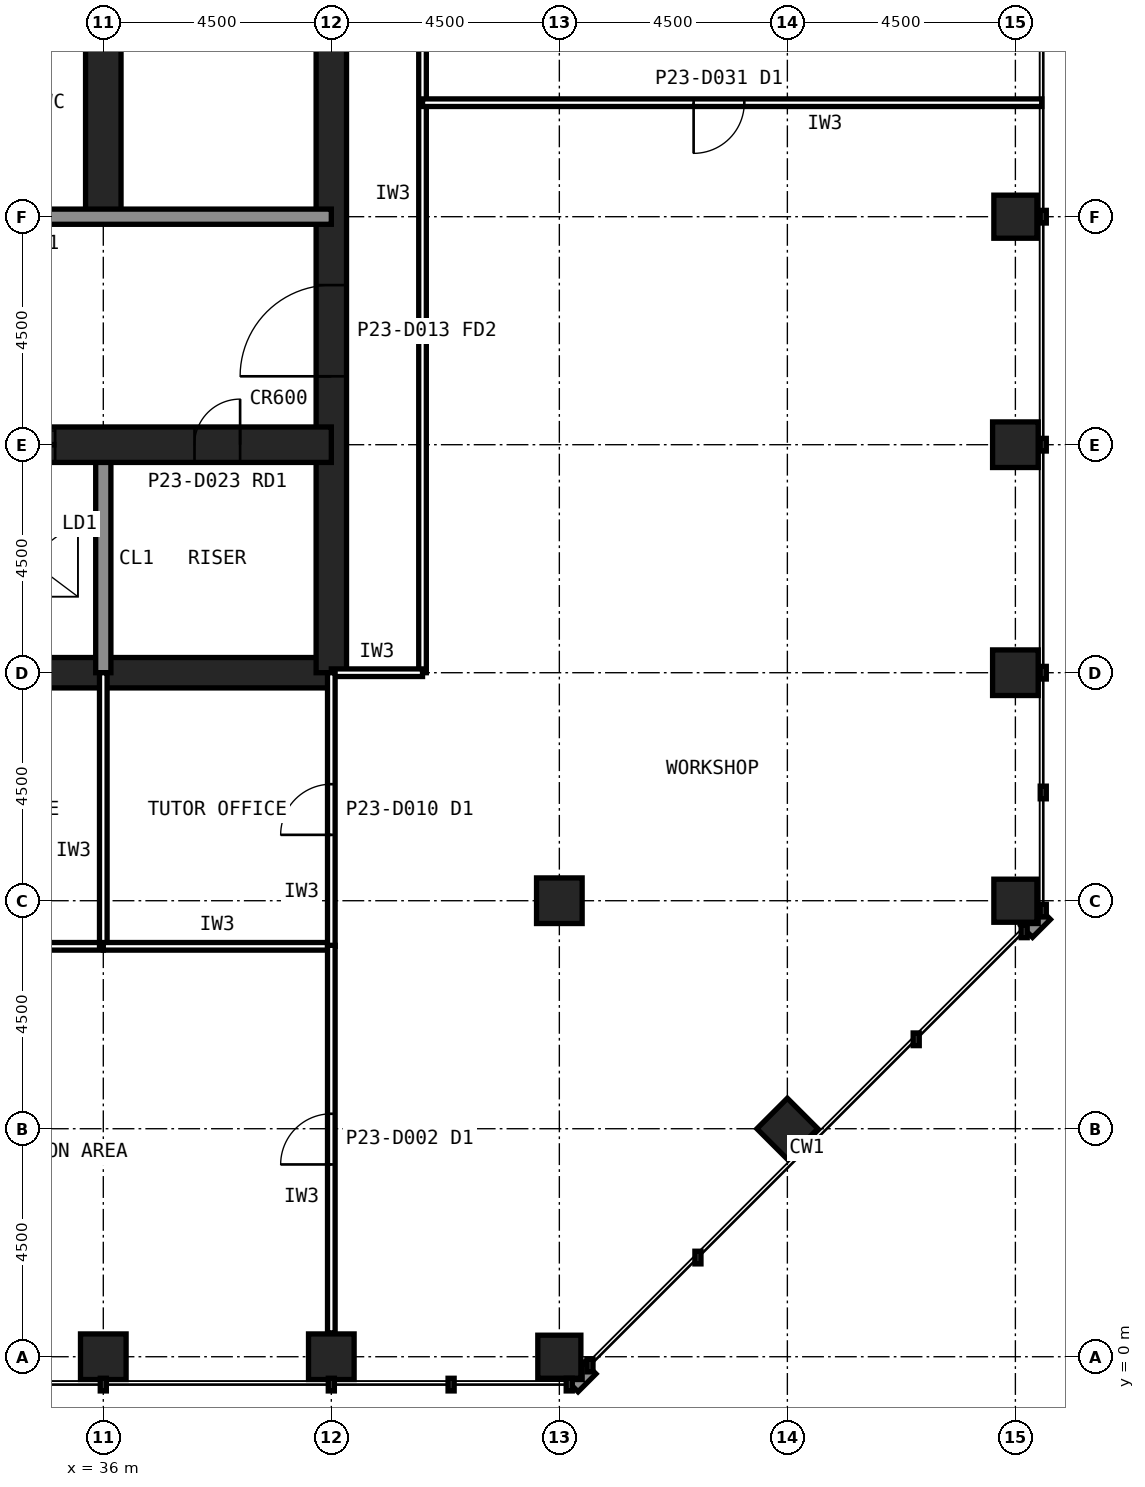
"""IFC4 building model, lengths in metres.
Left out: names, types, materials, properties, quantities, classifications, styles, units other than length and angle.
Written with IfcOpenShell. Run it as: python <this file> out.ifc"""

import sys

from ifc_helpers import new_model, si_unit, direction, frame, frame_2d, origin, origin_2d, place, context, subcontext, project, spatial, rectangle, hollow_rectangle, extrude, element, fill, save


model = new_model("IFC4")
c1 = context("Model", 3, precision=1e-05, world=origin(), true_north=direction((0.0, 1.0)))
c2 = subcontext(c1, "Body", "Model", "MODEL_VIEW")
j1 = project(units=[si_unit("LENGTHUNIT", "METRE"), si_unit("PLANEANGLEUNIT", "RADIAN")], contexts=[c1])
p1 = place(None, origin())
s1 = spatial("IfcSite", under=j1, at=p1, CompositionType="ELEMENT")
p2 = place(p1, origin())
s2 = spatial("IfcBuilding", under=s1, at=p2, CompositionType="ELEMENT")
p3 = place(p2, frame((0.0, 0.0, 96.2)))
s3 = spatial("IfcBuildingStorey", under=s2, at=p3, CompositionType="ELEMENT", Elevation=96.2)
p4 = place(p3, frame((36.0, 0.0, 0.0), z_axis=(0.0, 0.0, 1.0), x_axis=(1.0, 0.0, 0.0)))
e1 = element("IfcColumn", 1, at=p4, inside=s3, PredefinedType="COLUMN", context=c2, shape_type="SweptSolid", body=[
    extrude(hollow_rectangle(XDim=0.9, YDim=0.9, WallThickness=0.063, at=origin_2d()), origin(), (0.0, 0.0, 1.0), 4.2),
])
p5 = place(p3, frame((40.5, 0.0, 0.0), z_axis=(0.0, 0.0, 1.0), x_axis=(1.0, 0.0, 0.0)))
e2 = element("IfcColumn", 2, at=p5, inside=s3, PredefinedType="COLUMN", context=c2, shape_type="SweptSolid", body=[
    extrude(hollow_rectangle(XDim=0.85, YDim=0.85, WallThickness=0.05, at=origin_2d()), origin(), (0.0, 0.0, 1.0), 4.2),
])
for number, where, z_axis, x_axis in (
    (3, (45.0, 0.0, 0.0), (0.0, 0.0, 1.0), (1.0, 0.0, 0.0)),
    (4, (54.0, 9.0, 0.0), (0.0, 0.0, 1.0), (1.0, 0.0, 0.0)),
):
    element("IfcColumn", number, at=place(p3, frame(where, z_axis=z_axis, x_axis=x_axis)), inside=s3, PredefinedType="COLUMN", context=c2, shape_type="SweptSolid", body=[
        extrude(hollow_rectangle(XDim=0.8, YDim=0.8, WallThickness=0.045, at=origin_2d()), origin(), (0.0, 0.0, 1.0), 4.2),
    ])
p6 = place(p3, frame((54.0, 13.5, 0.0), z_axis=(0.0, 0.0, 1.0), x_axis=(1.0, 0.0, 0.0)))
e5 = element("IfcColumn", 5, at=p6, inside=s3, PredefinedType="COLUMN", context=c2, shape_type="SweptSolid", body=[
    extrude(hollow_rectangle(XDim=0.85, YDim=0.85, WallThickness=0.05, at=origin_2d()), origin(), (0.0, 0.0, 1.0), 4.2),
])
p7 = place(p3, frame((54.0, 18.0, 0.0), z_axis=(0.0, 0.0, 1.0), x_axis=(1.0, 0.0, 0.0)))
e6 = element("IfcColumn", 6, at=p7, inside=s3, PredefinedType="COLUMN", context=c2, shape_type="SweptSolid", body=[
    extrude(hollow_rectangle(XDim=0.9, YDim=0.9, WallThickness=0.063, at=origin_2d()), origin(), (0.0, 0.0, 1.0), 4.2),
])
for number, where, z_axis, x_axis in (
    (7, (54.0, 22.5, 0.0), (0.0, 0.0, 1.0), (1.0, 0.0, 0.0)),
    (8, (49.5, 4.5, 0.0), (0.0, 0.0, 1.0), (0.707, 0.707, 0.0)),
):
    element("IfcColumn", number, at=place(p3, frame(where, z_axis=z_axis, x_axis=x_axis)), inside=s3, PredefinedType="COLUMN", context=c2, shape_type="SweptSolid", body=[
        extrude(hollow_rectangle(XDim=0.8, YDim=0.8, WallThickness=0.045, at=origin_2d()), origin(), (0.0, 0.0, 1.0), 4.2),
    ])
p8 = place(p3, frame((45.0, 9.0, 0.0), z_axis=(0.0, 0.0, 1.0), x_axis=(1.0, 0.0, 0.0)))
e9 = element("IfcColumn", 9, at=p8, inside=s3, PredefinedType="COLUMN", context=c2, shape_type="SweptSolid", body=[
    extrude(hollow_rectangle(XDim=0.9, YDim=0.9, WallThickness=0.063, at=origin_2d()), origin(), (0.0, 0.0, 1.0), 4.2),
])
p9 = place(p3, frame((13.5, 13.5, 0.0), z_axis=(0.0, 0.0, 1.0), x_axis=(1.0, 0.0, 0.0)))
e10 = element("IfcWall", 10, at=p9, inside=s3, PredefinedType="SHEAR", context=c2, shape_type="SweptSolid", body=[
    extrude(rectangle(XDim=27.0, YDim=0.6, at=frame_2d((13.5, 0.0))), origin(), (0.0, 0.0, 1.0), 4.2),
])
p10 = place(p3, frame((40.5, 13.5, 0.0), z_axis=(0.0, 0.0, 1.0), x_axis=(0.0, 1.0, 0.0)))
e11 = element("IfcWall", 11, at=p10, inside=s3, PredefinedType="SHEAR", context=c2, shape_type="SweptSolid", body=[
    extrude(rectangle(XDim=27.0, YDim=0.6, at=frame_2d((13.5, 0.0))), origin(), (0.0, 0.0, 1.0), 4.2),
])
p11 = place(p10, frame((5.85, 0.0, 0.0)))
e12 = element("IfcOpeningElement", 12, at=p11, cuts=e11, PredefinedType="OPENING", context=c2, shape_type="SweptSolid", body=[
    extrude(rectangle(XDim=1.8, YDim=2.1, at=frame_2d((0.9, 1.05))), frame((0.0, 0.31, 0.0), z_axis=(0.0, -1.0, 0.0), x_axis=(1.0, 0.0, 0.0)), (0.0, 0.0, 1.0), 0.62),
])
p12 = place(p10, frame((19.65, 0.0, 0.0)))
e13 = element("IfcOpeningElement", 13, at=p12, cuts=e11, PredefinedType="OPENING", context=c2, shape_type="SweptSolid", body=[
    extrude(rectangle(XDim=1.2, YDim=2.1, at=frame_2d((0.6, 1.05))), frame((0.0, 0.31, 0.0), z_axis=(0.0, -1.0, 0.0), x_axis=(1.0, 0.0, 0.0)), (0.0, 0.0, 1.0), 0.62),
])
p13 = place(p3, frame((36.0, 13.5, 0.0), z_axis=(0.0, 0.0, 1.0), x_axis=(0.0, 1.0, 0.0)))
e14 = element("IfcWall", 14, at=p13, inside=s3, PredefinedType="SOLIDWALL", context=c2, shape_type="SweptSolid", body=[
    extrude(rectangle(XDim=4.5, YDim=0.3, at=frame_2d((2.25, 0.0))), origin(), (0.0, 0.0, 1.0), 4.04),
])
p14 = place(p3, frame((36.0, 22.5, 0.0), z_axis=(0.0, 0.0, 1.0), x_axis=(0.0, 1.0, 0.0)))
e15 = element("IfcWall", 15, at=p14, inside=s3, PredefinedType="SHEAR", context=c2, shape_type="SweptSolid", body=[
    extrude(rectangle(XDim=18.0, YDim=0.7, at=frame_2d((9.0, 0.0))), origin(), (0.0, 0.0, 1.0), 4.2),
])
p15 = place(p3, frame((13.5, 18.0, 0.0), z_axis=(0.0, 0.0, 1.0), x_axis=(1.0, 0.0, 0.0)))
e16 = element("IfcWall", 16, at=p15, inside=s3, PredefinedType="SHEAR", context=c2, shape_type="SweptSolid", body=[
    extrude(rectangle(XDim=27.0, YDim=0.7, at=frame_2d((13.5, 0.0))), origin(), (0.0, 0.0, 1.0), 4.2),
])
p16 = place(p15, frame((24.3, 0.0, 0.0)))
e17 = element("IfcOpeningElement", 17, at=p16, cuts=e16, PredefinedType="OPENING", context=c2, shape_type="SweptSolid", body=[
    extrude(rectangle(XDim=0.9, YDim=2.1, at=frame_2d((0.45, 1.05))), frame((0.0, 0.36, 0.0), z_axis=(0.0, -1.0, 0.0), x_axis=(1.0, 0.0, 0.0)), (0.0, 0.0, 1.0), 0.72),
])
p17 = place(p15, frame((5.45, 0.0, 0.0)))
e18 = element("IfcOpeningElement", 18, at=p17, cuts=e16, PredefinedType="OPENING", context=c2, shape_type="SweptSolid", body=[
    extrude(rectangle(XDim=1.1, YDim=2.1, at=frame_2d((0.55, 1.05))), frame((0.0, 0.36, 0.0), z_axis=(0.0, -1.0, 0.0), x_axis=(1.0, 0.0, 0.0)), (0.0, 0.0, 1.0), 0.72),
])
p18 = place(p15, frame((8.45, 0.0, 0.0)))
e19 = element("IfcOpeningElement", 19, at=p18, cuts=e16, PredefinedType="OPENING", context=c2, shape_type="SweptSolid", body=[
    extrude(rectangle(XDim=1.1, YDim=2.1, at=frame_2d((0.55, 1.05))), frame((0.0, 0.36, 0.0), z_axis=(0.0, -1.0, 0.0), x_axis=(1.0, 0.0, 0.0)), (0.0, 0.0, 1.0), 0.72),
])
p19 = place(p15, frame((11.45, 0.0, 0.0)))
e20 = element("IfcOpeningElement", 20, at=p19, cuts=e16, PredefinedType="OPENING", context=c2, shape_type="SweptSolid", body=[
    extrude(rectangle(XDim=1.1, YDim=2.1, at=frame_2d((0.55, 1.05))), frame((0.0, 0.36, 0.0), z_axis=(0.0, -1.0, 0.0), x_axis=(1.0, 0.0, 0.0)), (0.0, 0.0, 1.0), 0.72),
])
p20 = place(p15, frame((14.45, 0.0, 0.0)))
e21 = element("IfcOpeningElement", 21, at=p20, cuts=e16, PredefinedType="OPENING", context=c2, shape_type="SweptSolid", body=[
    extrude(rectangle(XDim=1.1, YDim=2.1, at=frame_2d((0.55, 1.05))), frame((0.0, 0.36, 0.0), z_axis=(0.0, -1.0, 0.0), x_axis=(1.0, 0.0, 0.0)), (0.0, 0.0, 1.0), 0.72),
])
p21 = place(p15, frame((17.45, 0.0, 0.0)))
e22 = element("IfcOpeningElement", 22, at=p21, cuts=e16, PredefinedType="OPENING", context=c2, shape_type="SweptSolid", body=[
    extrude(rectangle(XDim=1.1, YDim=2.1, at=frame_2d((0.55, 1.05))), frame((0.0, 0.36, 0.0), z_axis=(0.0, -1.0, 0.0), x_axis=(1.0, 0.0, 0.0)), (0.0, 0.0, 1.0), 0.72),
])
p22 = place(p15, frame((20.45, 0.0, 0.0)))
e23 = element("IfcOpeningElement", 23, at=p22, cuts=e16, PredefinedType="OPENING", context=c2, shape_type="SweptSolid", body=[
    extrude(rectangle(XDim=1.1, YDim=2.1, at=frame_2d((0.55, 1.05))), frame((0.0, 0.36, 0.0), z_axis=(0.0, -1.0, 0.0), x_axis=(1.0, 0.0, 0.0)), (0.0, 0.0, 1.0), 0.72),
])
p23 = place(p15, frame((1.6, 0.0, 0.0)))
e24 = element("IfcOpeningElement", 24, at=p23, cuts=e16, PredefinedType="OPENING", context=c2, shape_type="SweptSolid", body=[
    extrude(rectangle(XDim=1.3, YDim=2.2, at=frame_2d((0.65, 1.1))), frame((0.0, 0.36, 0.0), z_axis=(0.0, -1.0, 0.0), x_axis=(1.0, 0.0, 0.0)), (0.0, 0.0, 1.0), 0.72),
])
p24 = place(p3, frame((13.5, 22.5, 0.0), z_axis=(0.0, 0.0, 1.0), x_axis=(1.0, 0.0, 0.0)))
e25 = element("IfcWall", 25, at=p24, inside=s3, PredefinedType="SOLIDWALL", context=c2, shape_type="SweptSolid", body=[
    extrude(rectangle(XDim=27.0, YDim=0.3, at=frame_2d((13.5, 0.0))), origin(), (0.0, 0.0, 1.0), 4.04),
])
p25 = place(p24, frame((1.65, 0.0, 0.0)))
e26 = element("IfcOpeningElement", 26, at=p25, cuts=e25, PredefinedType="OPENING", context=c2, shape_type="SweptSolid", body=[
    extrude(rectangle(XDim=1.2, YDim=2.1, at=frame_2d((0.6, 1.05))), frame((0.0, 0.16, 0.0), z_axis=(0.0, -1.0, 0.0), x_axis=(1.0, 0.0, 0.0)), (0.0, 0.0, 1.0), 0.32),
])
p26 = place(p24, frame((6.025, 0.0, 0.0)))
e27 = element("IfcOpeningElement", 27, at=p26, cuts=e25, PredefinedType="OPENING", context=c2, shape_type="SweptSolid", body=[
    extrude(rectangle(XDim=1.0, YDim=2.1, at=frame_2d((0.5, 1.05))), frame((0.0, 0.16, 0.0), z_axis=(0.0, -1.0, 0.0), x_axis=(1.0, 0.0, 0.0)), (0.0, 0.0, 1.0), 0.32),
])
p27 = place(p24, frame((10.525, 0.0, 0.0)))
e28 = element("IfcOpeningElement", 28, at=p27, cuts=e25, PredefinedType="OPENING", context=c2, shape_type="SweptSolid", body=[
    extrude(rectangle(XDim=1.0, YDim=2.1, at=frame_2d((0.5, 1.05))), frame((0.0, 0.16, 0.0), z_axis=(0.0, -1.0, 0.0), x_axis=(1.0, 0.0, 0.0)), (0.0, 0.0, 1.0), 0.32),
])
p28 = place(p24, frame((19.75, 0.0, 0.0)))
e29 = element("IfcOpeningElement", 29, at=p28, cuts=e25, PredefinedType="OPENING", context=c2, shape_type="SweptSolid", body=[
    extrude(rectangle(XDim=1.0, YDim=2.1, at=frame_2d((0.5, 1.05))), frame((0.0, 0.16, 0.0), z_axis=(0.0, -1.0, 0.0), x_axis=(1.0, 0.0, 0.0)), (0.0, 0.0, 1.0), 0.32),
])
p29 = place(p24, frame((15.05, 0.0, 0.0)))
e30 = element("IfcOpeningElement", 30, at=p29, cuts=e25, PredefinedType="OPENING", context=c2, shape_type="SweptSolid", body=[
    extrude(rectangle(XDim=1.4, YDim=2.4, at=frame_2d((0.7, 1.2))), frame((0.0, 0.16, 0.0), z_axis=(0.0, -1.0, 0.0), x_axis=(1.0, 0.0, 0.0)), (0.0, 0.0, 1.0), 0.32),
])
p30 = place(p3, frame((42.3, 13.5, 0.0), z_axis=(0.0, 0.0, 1.0), x_axis=(0.0, 1.0, 0.0)))
e31 = element("IfcWall", 31, at=p30, inside=s3, PredefinedType="PARTITIONING", context=c2, shape_type="SweptSolid", body=[
    extrude(rectangle(XDim=28.8, YDim=0.15, at=frame_2d((14.4, 0.0))), origin(), (0.0, 0.0, 1.0), 4.04),
])
p31 = place(p30, frame((13.9, 0.0, 0.0)))
e32 = element("IfcOpeningElement", 32, at=p31, cuts=e31, PredefinedType="OPENING", context=c2, shape_type="SweptSolid", body=[
    extrude(rectangle(XDim=1.0, YDim=2.1, at=frame_2d((0.5, 1.05))), frame((0.0, 0.085, 0.0), z_axis=(0.0, -1.0, 0.0), x_axis=(1.0, 0.0, 0.0)), (0.0, 0.0, 1.0), 0.17),
])
p32 = place(p3, frame((40.5, 13.5, 0.0), z_axis=(0.0, 0.0, 1.0), x_axis=(1.0, 0.0, 0.0)))
e33 = element("IfcWall", 33, at=p32, inside=s3, PredefinedType="PARTITIONING", context=c2, shape_type="SweptSolid", body=[
    extrude(rectangle(XDim=1.8, YDim=0.15, at=frame_2d((0.9, 0.0))), origin(), (0.0, 0.0, 1.0), 3.189),
])
p33 = place(p3, frame((31.5, 8.1, 0.0), z_axis=(0.0, 0.0, 1.0), x_axis=(1.0, 0.0, 0.0)))
e34 = element("IfcWall", 34, at=p33, inside=s3, PredefinedType="PARTITIONING", context=c2, shape_type="SweptSolid", body=[
    extrude(rectangle(XDim=4.5, YDim=0.15, at=frame_2d((2.25, 0.0))), origin(), (0.0, 0.0, 1.0), 4.04),
])
p34 = place(p33, frame((1.75, 0.0, 0.0)))
e35 = element("IfcOpeningElement", 35, at=p34, cuts=e34, PredefinedType="OPENING", context=c2, shape_type="SweptSolid", body=[
    extrude(rectangle(XDim=1.0, YDim=2.1, at=frame_2d((0.5, 1.05))), frame((0.0, 0.085, 0.0), z_axis=(0.0, -1.0, 0.0), x_axis=(1.0, 0.0, 0.0)), (0.0, 0.0, 1.0), 0.17),
])
p35 = place(p3, frame((36.0, 8.1, 0.0), z_axis=(0.0, 0.0, 1.0), x_axis=(0.0, 1.0, 0.0)))
e36 = element("IfcWall", 36, at=p35, inside=s3, PredefinedType="PARTITIONING", context=c2, shape_type="SweptSolid", body=[
    extrude(rectangle(XDim=5.4, YDim=0.15, at=frame_2d((2.7, 0.0))), origin(), (0.0, 0.0, 1.0), 3.189),
])
p36 = place(p3, frame((36.0, 8.1, 0.0), z_axis=(0.0, 0.0, 1.0), x_axis=(1.0, 0.0, 0.0)))
e37 = element("IfcWall", 37, at=p36, inside=s3, PredefinedType="PARTITIONING", context=c2, shape_type="SweptSolid", body=[
    extrude(rectangle(XDim=4.5, YDim=0.15, at=frame_2d((2.25, 0.0))), origin(), (0.0, 0.0, 1.0), 4.04),
])
p37 = place(p3, frame((40.5, 8.1, 0.0), z_axis=(0.0, 0.0, 1.0), x_axis=(0.0, 1.0, 0.0)))
e38 = element("IfcWall", 38, at=p37, inside=s3, PredefinedType="PARTITIONING", context=c2, shape_type="SweptSolid", body=[
    extrude(rectangle(XDim=5.4, YDim=0.15, at=frame_2d((2.7, 0.0))), origin(), (0.0, 0.0, 1.0), 3.189),
])
p38 = place(p37, frame((2.2, 0.0, 0.0)))
e39 = element("IfcOpeningElement", 39, at=p38, cuts=e38, PredefinedType="OPENING", context=c2, shape_type="SweptSolid", body=[
    extrude(rectangle(XDim=1.0, YDim=2.1, at=frame_2d((0.5, 1.05))), frame((0.0, 0.085, 0.0), z_axis=(0.0, -1.0, 0.0), x_axis=(1.0, 0.0, 0.0)), (0.0, 0.0, 1.0), 0.17),
])
p39 = place(p3, frame((54.52, 24.75, 0.0), z_axis=(0.0, 0.0, 1.0), x_axis=(-1.0, 0.0, 0.0)))
e40 = element("IfcWall", 40, at=p39, inside=s3, PredefinedType="PARTITIONING", context=c2, shape_type="SweptSolid", body=[
    extrude(rectangle(XDim=12.22, YDim=0.15, at=frame_2d((6.11, 0.0))), origin(), (0.0, 0.0, 1.0), 4.04),
])
p40 = place(p39, frame((5.87, 0.0, 0.0)))
e41 = element("IfcOpeningElement", 41, at=p40, cuts=e40, PredefinedType="OPENING", context=c2, shape_type="SweptSolid", body=[
    extrude(rectangle(XDim=1.0, YDim=2.1, at=frame_2d((0.5, 1.05))), frame((0.0, 0.085, 0.0), z_axis=(0.0, -1.0, 0.0), x_axis=(1.0, 0.0, 0.0)), (0.0, 0.0, 1.0), 0.17),
])
p41 = place(p3, frame((40.5, 0.445, 0.0), z_axis=(0.0, 0.0, 1.0), x_axis=(0.0, 1.0, 0.0)))
e42 = element("IfcWall", 42, at=p41, inside=s3, PredefinedType="PARTITIONING", context=c2, shape_type="SweptSolid", body=[
    extrude(rectangle(XDim=7.675, YDim=0.15, at=frame_2d((3.837, 0.0))), origin(), (0.0, 0.0, 1.0), 3.189),
])
p42 = place(p41, frame((3.337, 0.0, 0.0)))
e43 = element("IfcOpeningElement", 43, at=p42, cuts=e42, PredefinedType="OPENING", context=c2, shape_type="SweptSolid", body=[
    extrude(rectangle(XDim=1.0, YDim=2.1, at=frame_2d((0.5, 1.05))), frame((0.0, 0.085, 0.0), z_axis=(0.0, -1.0, 0.0), x_axis=(1.0, 0.0, 0.0)), (0.0, 0.0, 1.0), 0.17),
])
p43 = place(p11, origin())
e44 = element("IfcDoor", 44, at=p43, inside=s3, OperationType="SINGLE_SWING_LEFT", PredefinedType="DOOR", context=c2, shape_type="SweptSolid", body=[
    extrude(rectangle(XDim=1.8, YDim=2.1, at=frame_2d((0.9, 1.05))), frame((0.0, 0.025, 0.0), z_axis=(0.0, -1.0, 0.0), x_axis=(1.0, 0.0, 0.0)), (0.0, 0.0, 1.0), 0.05),
])
fill(e12, e44)
p44 = place(p16, origin())
e45 = element("IfcDoor", 45, at=p44, inside=s3, OperationType="SINGLE_SWING_RIGHT", PredefinedType="DOOR", context=c2, shape_type="SweptSolid", body=[
    extrude(rectangle(XDim=0.9, YDim=2.1, at=frame_2d((0.45, 1.05))), frame((0.0, 0.025, 0.0), z_axis=(0.0, -1.0, 0.0), x_axis=(1.0, 0.0, 0.0)), (0.0, 0.0, 1.0), 0.05),
])
fill(e17, e45)
p45 = place(p22, origin())
e46 = element("IfcDoor", 46, at=p45, inside=s3, OperationType="SLIDING_TO_LEFT", PredefinedType="DOOR", context=c2, shape_type="SweptSolid", body=[
    extrude(rectangle(XDim=1.1, YDim=2.1, at=frame_2d((0.55, 1.05))), frame((0.0, 0.025, 0.0), z_axis=(0.0, -1.0, 0.0), x_axis=(1.0, 0.0, 0.0)), (0.0, 0.0, 1.0), 0.05),
])
fill(e23, e46)
p46 = place(p38, origin())
e47 = element("IfcDoor", 47, at=p46, inside=s3, OperationType="SINGLE_SWING_LEFT", PredefinedType="DOOR", context=c2, shape_type="SweptSolid", body=[
    extrude(rectangle(XDim=1.0, YDim=2.1, at=frame_2d((0.5, 1.05))), frame((0.0, 0.025, 0.0), z_axis=(0.0, -1.0, 0.0), x_axis=(1.0, 0.0, 0.0)), (0.0, 0.0, 1.0), 0.05),
])
fill(e39, e47)
p47 = place(p40, origin())
e48 = element("IfcDoor", 48, at=p47, inside=s3, OperationType="SINGLE_SWING_RIGHT", PredefinedType="DOOR", context=c2, shape_type="SweptSolid", body=[
    extrude(rectangle(XDim=1.0, YDim=2.1, at=frame_2d((0.5, 1.05))), frame((0.0, 0.025, 0.0), z_axis=(0.0, -1.0, 0.0), x_axis=(1.0, 0.0, 0.0)), (0.0, 0.0, 1.0), 0.05),
])
fill(e41, e48)
p48 = place(p42, origin())
e49 = element("IfcDoor", 49, at=p48, inside=s3, OperationType="SINGLE_SWING_LEFT", PredefinedType="DOOR", context=c2, shape_type="SweptSolid", body=[
    extrude(rectangle(XDim=1.0, YDim=2.1, at=frame_2d((0.5, 1.05))), frame((0.0, 0.025, 0.0), z_axis=(0.0, -1.0, 0.0), x_axis=(1.0, 0.0, 0.0)), (0.0, 0.0, 1.0), 0.05),
])
fill(e43, e49)
save(model, sys.argv[1])
